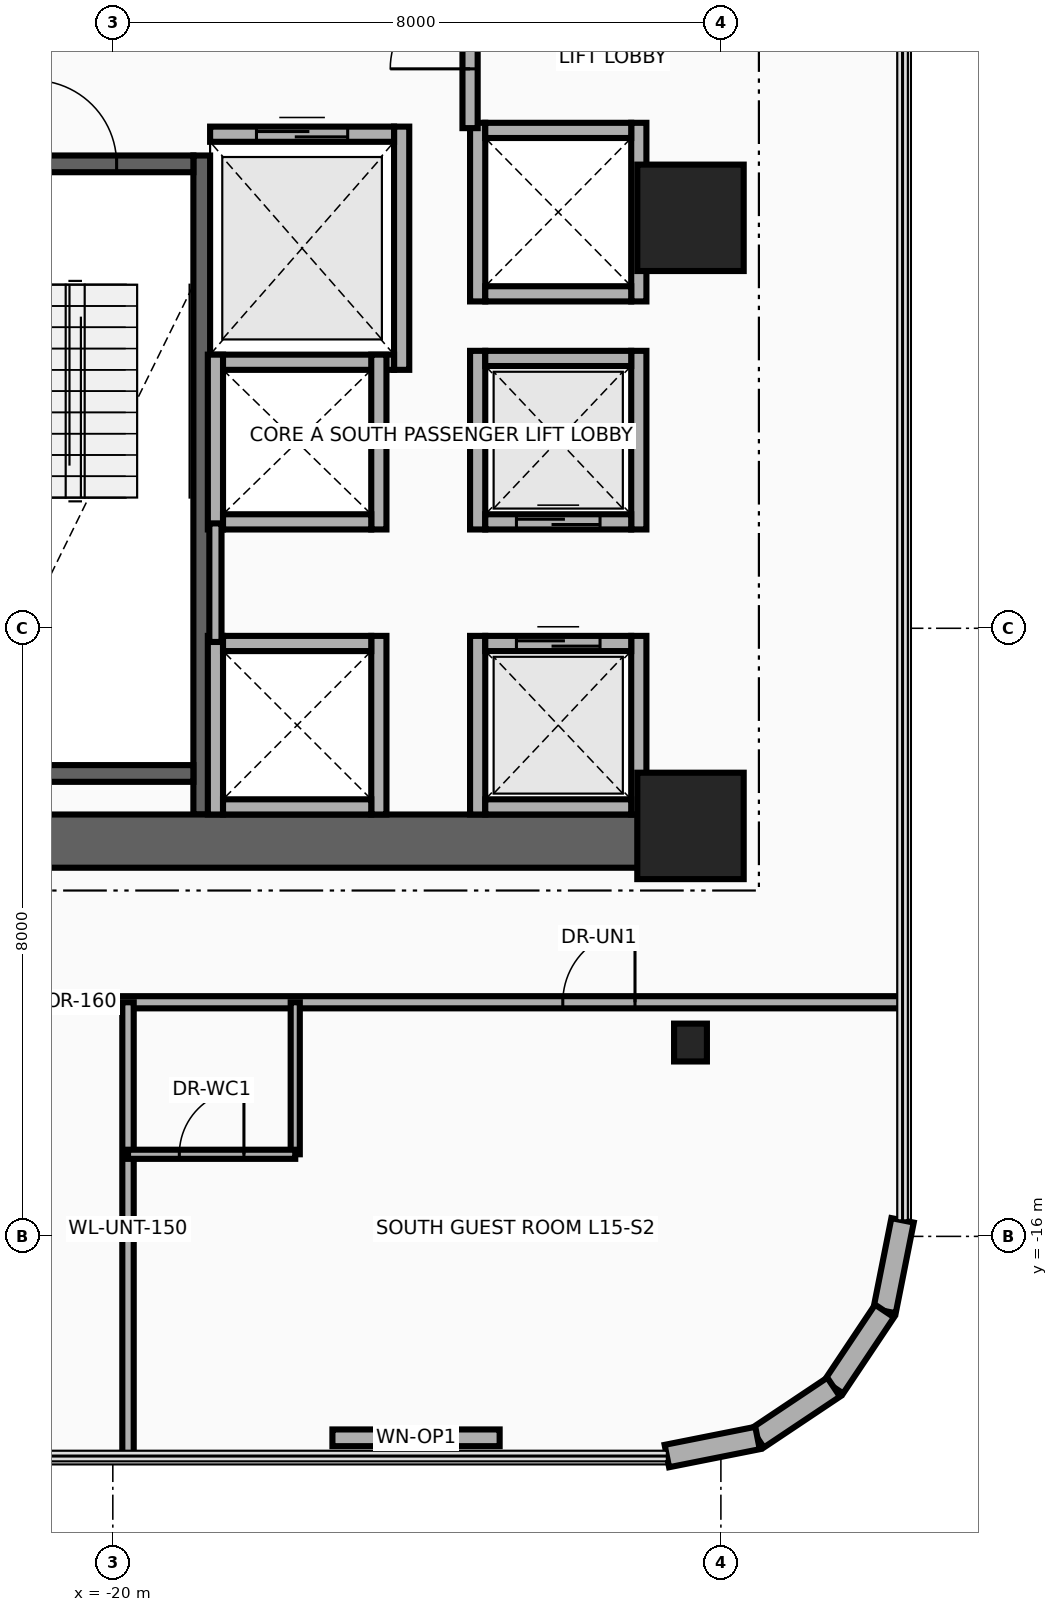
"""IFC4 building model, lengths in metres.
Left out: names, types, materials, properties, quantities, classifications, styles, units other than length and angle.
Written with IfcOpenShell. Run it as: python <this file> out.ifc"""

import sys

from ifc_helpers import new_model, si_unit, direction, frame, frame_2d, origin, origin_2d, place, context, subcontext, project, spatial, rectangle, i_section, extrude, source, transform, mapped, element, fill, save


model = new_model("IFC4")
c1 = context("Model", 3, precision=1e-05, world=origin(), true_north=direction((0.0, 1.0)))
c2 = subcontext(c1, "Body", "Model", "MODEL_VIEW")
j1 = project(units=[si_unit("LENGTHUNIT", "METRE"), si_unit("PLANEANGLEUNIT", "RADIAN")], contexts=[c1])
p1 = place(None, origin())
s1 = spatial("IfcSite", under=j1, at=p1, CompositionType="ELEMENT")
p2 = place(p1, origin())
s2 = spatial("IfcBuilding", under=s1, at=p2, CompositionType="ELEMENT")
p3 = place(p2, frame((0.0, 0.0, 63.0)))
s3 = spatial("IfcBuildingStorey", under=s2, at=p3, CompositionType="ELEMENT", Elevation=63.0)
p4 = place(p3, frame((-18.83, -10.45, 0.0), z_axis=(0.0, 0.0, 1.0), x_axis=(0.0, 1.0, 0.0)))
e1 = element("IfcWall", 1, at=p4, inside=s3, PredefinedType="SHEAR", context=c2, shape_type="SweptSolid", body=[
    extrude(rectangle(XDim=8.67, YDim=0.22, at=frame_2d((4.335, 0.0))), origin(), (0.0, 0.0, 1.0), 3.46),
])
p5 = place(p3, frame((-22.05, -9.91, 0.0), z_axis=(0.0, 0.0, 1.0), x_axis=(1.0, 0.0, 0.0)))
e2 = element("IfcWall", 2, at=p5, inside=s3, PredefinedType="SHEAR", context=c2, shape_type="SweptSolid", body=[
    extrude(rectangle(XDim=3.11, YDim=0.22, at=frame_2d((1.555, 0.0))), origin(), (0.0, 0.0, 1.0), 3.46),
])
p6 = place(p3, frame((-22.05, -1.89, 0.0), z_axis=(0.0, 0.0, 1.0), x_axis=(1.0, 0.0, 0.0)))
e3 = element("IfcWall", 3, at=p6, inside=s3, PredefinedType="SHEAR", context=c2, shape_type="SweptSolid", body=[
    extrude(rectangle(XDim=3.11, YDim=0.22, at=frame_2d((1.555, 0.0))), origin(), (0.0, 0.0, 1.0), 3.46),
])
p7 = place(p6, frame((1.0, 0.0, 0.0)))
e4 = element("IfcOpeningElement", 4, at=p7, cuts=e3, PredefinedType="OPENING", context=c2, shape_type="SweptSolid", body=[
    extrude(rectangle(XDim=1.1, YDim=2.15, at=frame_2d((0.55, 1.075))), frame((0.0, 0.125, 0.0), z_axis=(0.0, -1.0, 0.0), x_axis=(1.0, 0.0, 0.0)), (0.0, 0.0, 1.0), 0.25),
])
p8 = place(p3, frame((-22.65, -10.8, 0.0), z_axis=(0.0, 0.0, 1.0), x_axis=(1.0, 0.0, 0.0)))
e5 = element("IfcWall", 5, at=p8, inside=s3, PredefinedType="SHEAR", context=c2, shape_type="SweptSolid", body=[
    extrude(rectangle(XDim=10.25, YDim=0.7, at=frame_2d((5.125, 0.0))), origin(), (0.0, 0.0, 1.0), 3.46),
])
m1 = source(origin(), c2, "Body", "SweptSolid", [
    extrude(rectangle(XDim=1.4, YDim=1.4, at=origin_2d()), origin(), (0.0, 0.0, 1.0), 3.7),
])
for number, where, z_axis, x_axis in (
    (6, (-12.4, -10.6, 0.0), (0.0, 0.0, 1.0), (1.0, 0.0, 0.0)),
    (7, (-12.4, -2.6, 0.0), (0.0, 0.0, 1.0), (1.0, 0.0, 0.0)),
):
    element("IfcColumn", number, at=place(p3, frame(where, z_axis=z_axis, x_axis=x_axis)), inside=s3, PredefinedType="COLUMN", context=c2, shape_type="MappedRepresentation", body=[
        mapped(m1, transform((0.0, 0.0, 0.0), x_axis=(1.0, 0.0, 0.0), y_axis=(0.0, 1.0, 0.0), z_axis=(0.0, 0.0, 1.0), scale=1.0)),
    ])
m2 = source(origin(), c2, "Body", "SweptSolid", [
    extrude(i_section(OverallWidth=0.432, OverallDepth=0.498, WebThickness=0.056, FlangeThickness=0.089, at=origin_2d()), origin(), (0.0, 0.0, 1.0), 3.7),
])
p9 = place(p3, frame((-12.4, -13.45, 0.0), z_axis=(0.0, 0.0, 1.0), x_axis=(1.0, 0.0, 0.0)))
e8 = element("IfcColumn", 8, at=p9, inside=s3, PredefinedType="COLUMN", context=c2, shape_type="MappedRepresentation", body=[
    mapped(m2, transform((0.0, 0.0, 0.0), x_axis=(1.0, 0.0, 0.0), y_axis=(0.0, 1.0, 0.0), z_axis=(0.0, 0.0, 1.0), scale=1.0)),
])
p10 = place(p3, frame((-9.61, -15.789, 0.0), z_axis=(0.0, 0.0, 1.0), x_axis=(-0.194996050505, -0.980804027463, 0.0)))
e9 = element("IfcWall", 9, at=p10, inside=s3, PredefinedType="SOLIDWALL", context=c2, shape_type="SweptSolid", body=[
    extrude(rectangle(XDim=1.216, YDim=0.3, at=frame_2d((0.608, 0.0))), origin(), (0.0, 0.0, 1.0), 3.46),
])
for number, where, z_axis, x_axis in (
    (10, (-9.847, -16.982, 0.0), (0.0, 0.0, 1.0), (-0.556, -0.831, 0.0)),
    (11, (-10.517, -17.983, 0.0), (0.0, 0.0, 1.0), (-0.831, -0.556, 0.0)),
):
    element("IfcWall", number, at=place(p3, frame(where, z_axis=z_axis, x_axis=x_axis)), inside=s3, PredefinedType="SOLIDWALL", context=c2, shape_type="SweptSolid", body=[
        extrude(rectangle(XDim=1.205, YDim=0.3, at=frame_2d((0.603, 0.0))), origin(), (0.0, 0.0, 1.0), 3.46),
    ])
p11 = place(p3, frame((-11.518, -18.653, 0.0), z_axis=(0.0, 0.0, 1.0), x_axis=(-0.980804027463, -0.194996050505, 0.0)))
e12 = element("IfcWall", 12, at=p11, inside=s3, PredefinedType="SOLIDWALL", context=c2, shape_type="SweptSolid", body=[
    extrude(rectangle(XDim=1.216, YDim=0.3, at=frame_2d((0.608, 0.0))), origin(), (0.0, 0.0, 1.0), 3.46),
])
p12 = place(p3, frame((-14.911, -18.65, 0.0), z_axis=(0.0, 0.0, 1.0), x_axis=(-1.0, 0.0, 0.0)))
e13 = element("IfcWall", 13, at=p12, inside=s3, PredefinedType="SOLIDWALL", context=c2, shape_type="SweptSolid", body=[
    extrude(rectangle(XDim=2.2, YDim=0.22, at=frame_2d((1.1, 0.0))), origin(), (0.0, 0.0, 1.0), 3.46),
])
p13 = place(p12, frame((0.65, 0.0, 0.95)))
e14 = element("IfcOpeningElement", 14, at=p13, cuts=e13, PredefinedType="OPENING", context=c2, shape_type="SweptSolid", body=[
    extrude(rectangle(XDim=0.9, YDim=1.3, at=frame_2d((0.45, 0.65))), frame((0.0, 0.125, 0.0), z_axis=(0.0, -1.0, 0.0), x_axis=(1.0, 0.0, 0.0)), (0.0, 0.0, 1.0), 0.25),
])
p14 = place(p3, frame((-16.2, -4.6, 0.0), z_axis=(0.0, 0.0, 1.0), x_axis=(0.0, 1.0, 0.0)))
e15 = element("IfcWall", 15, at=p14, inside=s3, PredefinedType="MOVABLE", context=c2, shape_type="SweptSolid", body=[
    extrude(rectangle(XDim=3.2, YDim=0.2, at=frame_2d((1.6, 0.0))), origin(), (0.0, 0.0, 1.0), 3.46),
])
p15 = place(p3, frame((-18.72, -4.5, 0.0), z_axis=(0.0, 0.0, 1.0), x_axis=(1.0, 0.0, 0.0)))
e16 = element("IfcWall", 16, at=p15, inside=s3, PredefinedType="MOVABLE", context=c2, shape_type="SweptSolid", body=[
    extrude(rectangle(XDim=2.42, YDim=0.2, at=frame_2d((1.21, 0.0))), origin(), (0.0, 0.0, 1.0), 3.46),
])
p16 = place(p3, frame((-18.72, -1.5, 0.0), z_axis=(0.0, 0.0, 1.0), x_axis=(1.0, 0.0, 0.0)))
e17 = element("IfcWall", 17, at=p16, inside=s3, PredefinedType="MOVABLE", context=c2, shape_type="SweptSolid", body=[
    extrude(rectangle(XDim=2.42, YDim=0.2, at=frame_2d((1.21, 0.0))), origin(), (0.0, 0.0, 1.0), 3.46),
])
p17 = place(p16, frame((0.61, 0.0, 0.0)))
e18 = element("IfcOpeningElement", 18, at=p17, cuts=e17, PredefinedType="OPENING", context=c2, shape_type="SweptSolid", body=[
    extrude(rectangle(XDim=1.2, YDim=2.1, at=frame_2d((0.6, 1.05))), frame((0.0, 0.115, 0.0), z_axis=(0.0, -1.0, 0.0), x_axis=(1.0, 0.0, 0.0)), (0.0, 0.0, 1.0), 0.23),
])
for number, where, z_axis, x_axis in (
    (19, (-15.2, -10.45, 0.0), (0.0, 0.0, 1.0), (0.0, 1.0, 0.0)),
    (20, (-13.08, -10.45, 0.0), (0.0, 0.0, 1.0), (0.0, 1.0, 0.0)),
):
    element("IfcWall", number, at=place(p3, frame(where, z_axis=z_axis, x_axis=x_axis)), inside=s3, PredefinedType="MOVABLE", context=c2, shape_type="SweptSolid", body=[
        extrude(rectangle(XDim=2.35, YDim=0.2, at=frame_2d((1.175, 0.0))), origin(), (0.0, 0.0, 1.0), 2.583),
    ])
p18 = place(p3, frame((-15.1, -10.35, 0.0), z_axis=(0.0, 0.0, 1.0), x_axis=(1.0, 0.0, 0.0)))
e21 = element("IfcWall", 21, at=p18, inside=s3, PredefinedType="MOVABLE", context=c2, shape_type="SweptSolid", body=[
    extrude(rectangle(XDim=1.92, YDim=0.2, at=frame_2d((0.96, 0.0))), origin(), (0.0, 0.0, 1.0), 2.583),
])
p19 = place(p3, frame((-15.1, -8.2, 0.0), z_axis=(0.0, 0.0, 1.0), x_axis=(1.0, 0.0, 0.0)))
e22 = element("IfcWall", 22, at=p19, inside=s3, PredefinedType="MOVABLE", context=c2, shape_type="SweptSolid", body=[
    extrude(rectangle(XDim=1.92, YDim=0.2, at=frame_2d((0.96, 0.0))), origin(), (0.0, 0.0, 1.0), 3.46),
])
p20 = place(p19, frame((0.41, 0.0, 0.0)))
e23 = element("IfcOpeningElement", 23, at=p20, cuts=e22, PredefinedType="OPENING", context=c2, shape_type="SweptSolid", body=[
    extrude(rectangle(XDim=1.1, YDim=2.1, at=frame_2d((0.55, 1.05))), frame((0.0, 0.115, 0.0), z_axis=(0.0, -1.0, 0.0), x_axis=(1.0, 0.0, 0.0)), (0.0, 0.0, 1.0), 0.23),
])
for number, where, z_axis, x_axis in (
    (24, (-15.2, -6.7, 0.0), (0.0, 0.0, 1.0), (0.0, 1.0, 0.0)),
    (25, (-13.08, -6.7, 0.0), (0.0, 0.0, 1.0), (0.0, 1.0, 0.0)),
):
    element("IfcWall", number, at=place(p3, frame(where, z_axis=z_axis, x_axis=x_axis)), inside=s3, PredefinedType="MOVABLE", context=c2, shape_type="SweptSolid", body=[
        extrude(rectangle(XDim=2.35, YDim=0.2, at=frame_2d((1.175, 0.0))), origin(), (0.0, 0.0, 1.0), 3.46),
    ])
p21 = place(p3, frame((-15.1, -6.6, 0.0), z_axis=(0.0, 0.0, 1.0), x_axis=(1.0, 0.0, 0.0)))
e26 = element("IfcWall", 26, at=p21, inside=s3, PredefinedType="MOVABLE", context=c2, shape_type="SweptSolid", body=[
    extrude(rectangle(XDim=1.92, YDim=0.2, at=frame_2d((0.96, 0.0))), origin(), (0.0, 0.0, 1.0), 3.46),
])
p22 = place(p21, frame((0.41, 0.0, 0.0)))
e27 = element("IfcOpeningElement", 27, at=p22, cuts=e26, PredefinedType="OPENING", context=c2, shape_type="SweptSolid", body=[
    extrude(rectangle(XDim=1.1, YDim=2.1, at=frame_2d((0.55, 1.05))), frame((0.0, 0.115, 0.0), z_axis=(0.0, -1.0, 0.0), x_axis=(1.0, 0.0, 0.0)), (0.0, 0.0, 1.0), 0.23),
])
p23 = place(p3, frame((-15.1, -4.45, 0.0), z_axis=(0.0, 0.0, 1.0), x_axis=(1.0, 0.0, 0.0)))
e28 = element("IfcWall", 28, at=p23, inside=s3, PredefinedType="MOVABLE", context=c2, shape_type="SweptSolid", body=[
    extrude(rectangle(XDim=1.92, YDim=0.2, at=frame_2d((0.96, 0.0))), origin(), (0.0, 0.0, 1.0), 3.46),
])
for number, where, z_axis, x_axis in (
    (29, (-18.65, -10.45, 0.0), (0.0, 0.0, 1.0), (0.0, 1.0, 0.0)),
    (30, (-16.5, -10.45, 0.0), (0.0, 0.0, 1.0), (0.0, 1.0, 0.0)),
):
    element("IfcWall", number, at=place(p3, frame(where, z_axis=z_axis, x_axis=x_axis)), inside=s3, PredefinedType="MOVABLE", context=c2, shape_type="SweptSolid", body=[
        extrude(rectangle(XDim=2.35, YDim=0.2, at=frame_2d((1.175, 0.0))), origin(), (0.0, 0.0, 1.0), 2.583),
    ])
p24 = place(p3, frame((-18.55, -10.35, 0.0), z_axis=(0.0, 0.0, 1.0), x_axis=(1.0, 0.0, 0.0)))
e31 = element("IfcWall", 31, at=p24, inside=s3, PredefinedType="MOVABLE", context=c2, shape_type="SweptSolid", body=[
    extrude(rectangle(XDim=1.95, YDim=0.2, at=frame_2d((0.975, 0.0))), origin(), (0.0, 0.0, 1.0), 2.583),
])
p25 = place(p3, frame((-18.55, -8.2, 0.0), z_axis=(0.0, 0.0, 1.0), x_axis=(1.0, 0.0, 0.0)))
e32 = element("IfcWall", 32, at=p25, inside=s3, PredefinedType="MOVABLE", context=c2, shape_type="SweptSolid", body=[
    extrude(rectangle(XDim=1.95, YDim=0.2, at=frame_2d((0.975, 0.0))), origin(), (0.0, 0.0, 1.0), 3.46),
])
for number, where, z_axis, x_axis in (
    (33, (-18.65, -6.7, 0.0), (0.0, 0.0, 1.0), (0.0, 1.0, 0.0)),
    (34, (-16.5, -6.7, 0.0), (0.0, 0.0, 1.0), (0.0, 1.0, 0.0)),
):
    element("IfcWall", number, at=place(p3, frame(where, z_axis=z_axis, x_axis=x_axis)), inside=s3, PredefinedType="MOVABLE", context=c2, shape_type="SweptSolid", body=[
        extrude(rectangle(XDim=2.3, YDim=0.2, at=frame_2d((1.15, 0.0))), origin(), (0.0, 0.0, 1.0), 3.46),
    ])
p26 = place(p3, frame((-18.55, -6.6, 0.0), z_axis=(0.0, 0.0, 1.0), x_axis=(1.0, 0.0, 0.0)))
e35 = element("IfcWall", 35, at=p26, inside=s3, PredefinedType="MOVABLE", context=c2, shape_type="SweptSolid", body=[
    extrude(rectangle(XDim=1.95, YDim=0.2, at=frame_2d((0.975, 0.0))), origin(), (0.0, 0.0, 1.0), 3.46),
])
for number, where, z_axis, x_axis in (
    (36, (-15.2, -3.7, 0.0), (0.0, 0.0, 1.0), (0.0, 1.0, 0.0)),
    (37, (-13.08, -3.7, 0.0), (0.0, 0.0, 1.0), (0.0, 1.0, 0.0)),
):
    element("IfcWall", number, at=place(p3, frame(where, z_axis=z_axis, x_axis=x_axis)), inside=s3, PredefinedType="MOVABLE", context=c2, shape_type="SweptSolid", body=[
        extrude(rectangle(XDim=2.35, YDim=0.2, at=frame_2d((1.175, 0.0))), origin(), (0.0, 0.0, 1.0), 3.46),
    ])
for number, where, z_axis, x_axis in (
    (38, (-15.1, -3.6, 0.0), (0.0, 0.0, 1.0), (1.0, 0.0, 0.0)),
    (39, (-15.1, -1.45, 0.0), (0.0, 0.0, 1.0), (1.0, 0.0, 0.0)),
):
    element("IfcWall", number, at=place(p3, frame(where, z_axis=z_axis, x_axis=x_axis)), inside=s3, PredefinedType="MOVABLE", context=c2, shape_type="SweptSolid", body=[
        extrude(rectangle(XDim=1.92, YDim=0.2, at=frame_2d((0.96, 0.0))), origin(), (0.0, 0.0, 1.0), 3.46),
    ])
p27 = place(p3, frame((-15.3, -1.42, 0.0), z_axis=(0.0, 0.0, 1.0), x_axis=(0.0, 1.0, 0.0)))
e40 = element("IfcWall", 40, at=p27, inside=s3, PredefinedType="PARTITIONING", context=c2, shape_type="SweptSolid", body=[
    extrude(rectangle(XDim=2.67, YDim=0.2, at=frame_2d((1.335, 0.0))), origin(), (0.0, 0.0, 1.0), 3.46),
])
p28 = place(p27, frame((0.78, 0.0, 0.0)))
e41 = element("IfcOpeningElement", 41, at=p28, cuts=e40, PredefinedType="OPENING", context=c2, shape_type="SweptSolid", body=[
    extrude(rectangle(XDim=1.05, YDim=2.15, at=frame_2d((0.525, 1.075))), frame((0.0, 0.115, 0.0), z_axis=(0.0, -1.0, 0.0), x_axis=(1.0, 0.0, 0.0)), (0.0, 0.0, 1.0), 0.23),
])
p29 = place(p3, frame((-18.65, -8.18, 0.0), z_axis=(0.0, 0.0, 1.0), x_axis=(0.0, 1.0, 0.0)))
e42 = element("IfcWall", 42, at=p29, inside=s3, PredefinedType="PARTITIONING", context=c2, shape_type="SweptSolid", body=[
    extrude(rectangle(XDim=1.56, YDim=0.16, at=frame_2d((0.78, 0.0))), origin(), (0.0, 0.0, 1.0), 3.46),
])
p30 = place(p3, frame((-31.89, -12.92, 0.0), z_axis=(0.0, 0.0, 1.0), x_axis=(1.0, 0.0, 0.0)))
e43 = element("IfcWall", 43, at=p30, inside=s3, PredefinedType="PARTITIONING", context=c2, shape_type="SweptSolid", body=[
    extrude(rectangle(XDim=22.28, YDim=0.16, at=frame_2d((11.14, 0.0))), origin(), (0.0, 0.0, 1.0), 2.834),
])
p31 = place(p30, frame((6.67, 0.0, 0.0)))
e44 = element("IfcOpeningElement", 44, at=p31, cuts=e43, PredefinedType="OPENING", context=c2, shape_type="SweptSolid", body=[
    extrude(rectangle(XDim=0.95, YDim=2.15, at=frame_2d((0.475, 1.075))), frame((0.0, 0.095, 0.0), z_axis=(0.0, -1.0, 0.0), x_axis=(1.0, 0.0, 0.0)), (0.0, 0.0, 1.0), 0.19),
])
p32 = place(p30, frame((17.81, 0.0, 0.0)))
e45 = element("IfcOpeningElement", 45, at=p32, cuts=e43, PredefinedType="OPENING", context=c2, shape_type="SweptSolid", body=[
    extrude(rectangle(XDim=0.95, YDim=2.15, at=frame_2d((0.475, 1.075))), frame((0.0, 0.095, 0.0), z_axis=(0.0, -1.0, 0.0), x_axis=(1.0, 0.0, 0.0)), (0.0, 0.0, 1.0), 0.19),
])
p33 = place(p3, frame((-19.8, -18.89, 0.0), z_axis=(0.0, 0.0, 1.0), x_axis=(0.0, 1.0, 0.0)))
e46 = element("IfcWall", 46, at=p33, inside=s3, PredefinedType="PARTITIONING", context=c2, shape_type="SweptSolid", body=[
    extrude(rectangle(XDim=5.97, YDim=0.15, at=frame_2d((2.985, 0.0))), origin(), (0.0, 0.0, 1.0), 2.896),
])
p34 = place(p3, frame((-17.6, -14.92, 0.0), z_axis=(0.0, 0.0, 1.0), x_axis=(0.0, 1.0, 0.0)))
e47 = element("IfcWall", 47, at=p34, inside=s3, PredefinedType="PARTITIONING", context=c2, shape_type="SweptSolid", body=[
    extrude(rectangle(XDim=2.0, YDim=0.12, at=frame_2d((1.0, 0.0))), origin(), (0.0, 0.0, 1.0), 2.896),
])
p35 = place(p3, frame((-19.8, -14.92, 0.0), z_axis=(0.0, 0.0, 1.0), x_axis=(1.0, 0.0, 0.0)))
e48 = element("IfcWall", 48, at=p35, inside=s3, PredefinedType="PARTITIONING", context=c2, shape_type="SweptSolid", body=[
    extrude(rectangle(XDim=2.2, YDim=0.12, at=frame_2d((1.1, 0.0))), origin(), (0.0, 0.0, 1.0), 3.46),
])
p36 = place(p35, frame((0.675, 0.0, 0.0)))
e49 = element("IfcOpeningElement", 49, at=p36, cuts=e48, PredefinedType="OPENING", context=c2, shape_type="SweptSolid", body=[
    extrude(rectangle(XDim=0.85, YDim=2.1, at=frame_2d((0.425, 1.05))), frame((0.0, 0.075, 0.0), z_axis=(0.0, -1.0, 0.0), x_axis=(1.0, 0.0, 0.0)), (0.0, 0.0, 1.0), 0.15),
])
p37 = place(p13, origin())
e50 = element("IfcWindow", 50, at=p37, inside=s3, PartitioningType="SINGLE_PANEL", PredefinedType="WINDOW", context=c2, shape_type="SweptSolid", body=[
    extrude(rectangle(XDim=0.9, YDim=1.3, at=frame_2d((0.45, 0.65))), frame((0.0, 0.03, 0.0), z_axis=(0.0, -1.0, 0.0), x_axis=(1.0, 0.0, 0.0)), (0.0, 0.0, 1.0), 0.06),
])
fill(e14, e50)
p38 = place(p17, origin())
e51 = element("IfcDoor", 51, at=p38, inside=s3, OperationType="DOUBLE_DOOR_SLIDING", PredefinedType="DOOR", context=c2, shape_type="SweptSolid", body=[
    extrude(rectangle(XDim=1.2, YDim=2.1, at=frame_2d((0.6, 1.05))), frame((0.0, 0.025, 0.0), z_axis=(0.0, -1.0, 0.0), x_axis=(1.0, 0.0, 0.0)), (0.0, 0.0, 1.0), 0.05),
])
fill(e18, e51)
p39 = place(p20, origin())
e52 = element("IfcDoor", 52, at=p39, inside=s3, OperationType="DOUBLE_DOOR_SLIDING", PredefinedType="DOOR", context=c2, shape_type="SweptSolid", body=[
    extrude(rectangle(XDim=1.1, YDim=2.1, at=frame_2d((0.55, 1.05))), frame((0.0, 0.025, 0.0), z_axis=(0.0, -1.0, 0.0), x_axis=(1.0, 0.0, 0.0)), (0.0, 0.0, 1.0), 0.05),
])
fill(e23, e52)
p40 = place(p22, origin())
e53 = element("IfcDoor", 53, at=p40, inside=s3, OperationType="DOUBLE_DOOR_SLIDING", PredefinedType="DOOR", context=c2, shape_type="SweptSolid", body=[
    extrude(rectangle(XDim=1.1, YDim=2.1, at=frame_2d((0.55, 1.05))), frame((0.0, 0.025, 0.0), z_axis=(0.0, -1.0, 0.0), x_axis=(1.0, 0.0, 0.0)), (0.0, 0.0, 1.0), 0.05),
])
fill(e27, e53)
p41 = place(p28, origin())
e54 = element("IfcDoor", 54, at=p41, inside=s3, OperationType="SINGLE_SWING_RIGHT", PredefinedType="DOOR", context=c2, shape_type="SweptSolid", body=[
    extrude(rectangle(XDim=1.05, YDim=2.15, at=frame_2d((0.525, 1.075))), frame((0.0, 0.025, 0.0), z_axis=(0.0, -1.0, 0.0), x_axis=(1.0, 0.0, 0.0)), (0.0, 0.0, 1.0), 0.05),
])
fill(e41, e54)
p42 = place(p7, origin())
e55 = element("IfcDoor", 55, at=p42, inside=s3, OperationType="SINGLE_SWING_RIGHT", PredefinedType="DOOR", context=c2, shape_type="SweptSolid", body=[
    extrude(rectangle(XDim=1.1, YDim=2.15, at=frame_2d((0.55, 1.075))), frame((0.0, 0.025, 0.0), z_axis=(0.0, -1.0, 0.0), x_axis=(1.0, 0.0, 0.0)), (0.0, 0.0, 1.0), 0.05),
])
fill(e4, e55)
p43 = place(p32, origin())
e56 = element("IfcDoor", 56, at=p43, inside=s3, OperationType="SINGLE_SWING_RIGHT", PredefinedType="DOOR", context=c2, shape_type="SweptSolid", body=[
    extrude(rectangle(XDim=0.95, YDim=2.15, at=frame_2d((0.475, 1.075))), frame((0.0, 0.025, 0.0), z_axis=(0.0, -1.0, 0.0), x_axis=(1.0, 0.0, 0.0)), (0.0, 0.0, 1.0), 0.05),
])
fill(e45, e56)
p44 = place(p36, origin())
e57 = element("IfcDoor", 57, at=p44, inside=s3, OperationType="SINGLE_SWING_LEFT", PredefinedType="DOOR", context=c2, shape_type="SweptSolid", body=[
    extrude(rectangle(XDim=0.85, YDim=2.1, at=frame_2d((0.425, 1.05))), frame((0.0, 0.025, 0.0), z_axis=(0.0, -1.0, 0.0), x_axis=(1.0, 0.0, 0.0)), (0.0, 0.0, 1.0), 0.05),
])
fill(e49, e57)
save(model, sys.argv[1])
